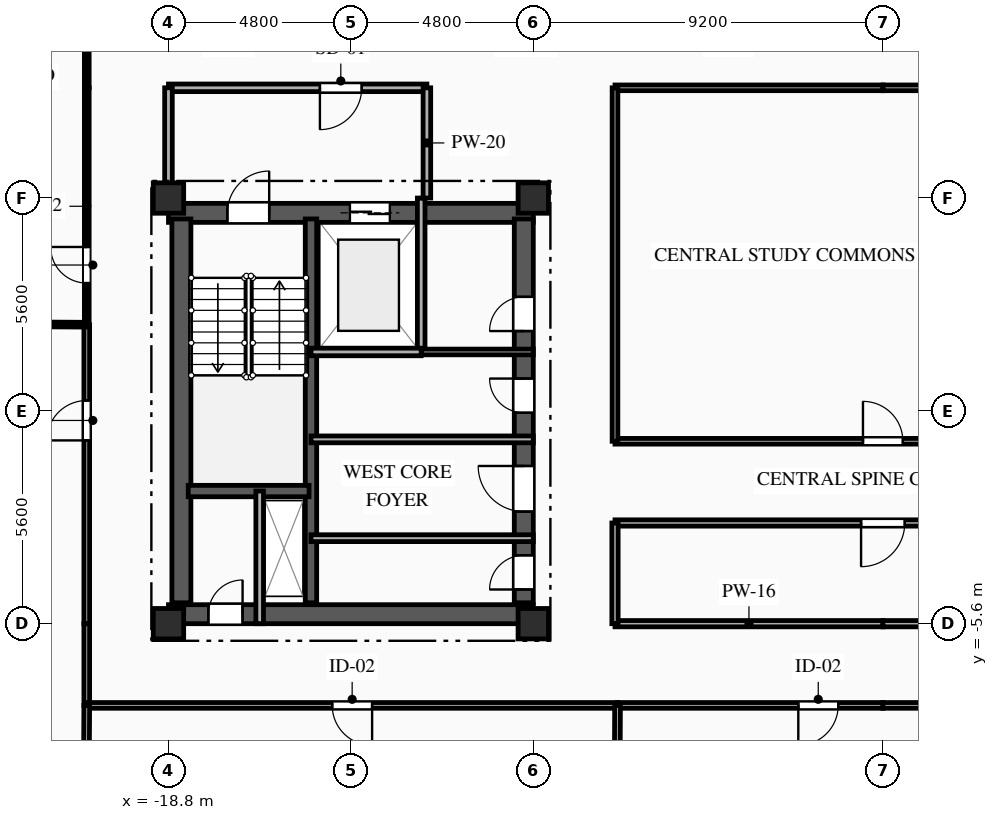
"""IFC4 building model, lengths in metres.
Left out: names, types, materials, properties, quantities, classifications, styles, units other than length and angle.
Written with IfcOpenShell. Run it as: python <this file> out.ifc"""

import sys

from ifc_helpers import new_model, si_unit, direction, frame, frame_2d, origin, origin_2d, place, context, subcontext, project, spatial, rectangle, extrude, element, fill, save


model = new_model("IFC4")
c1 = context("Model", 3, precision=1e-05, world=origin(), true_north=direction((0.0, 1.0)))
c2 = subcontext(c1, "Body", "Model", "MODEL_VIEW")
j1 = project(units=[si_unit("LENGTHUNIT", "METRE"), si_unit("PLANEANGLEUNIT", "RADIAN")], contexts=[c1])
p1 = place(None, origin())
s1 = spatial("IfcSite", under=j1, at=p1, CompositionType="ELEMENT")
p2 = place(p1, origin())
s2 = spatial("IfcBuilding", under=s1, at=p2, CompositionType="ELEMENT")
p3 = place(p2, frame((0.0, 0.0, 199.75)))
s3 = spatial("IfcBuildingStorey", under=s2, at=p3, CompositionType="ELEMENT", Elevation=199.75)
for number, where, z_axis, x_axis in (
    (1, (-18.8, -5.6, 0.0), (0.0, 0.0, 1.0), (1.0, 0.0, 0.0)),
    (2, (-18.8, 5.6, 0.0), (0.0, 0.0, 1.0), (1.0, 0.0, 0.0)),
    (3, (-9.2, -5.6, 0.0), (0.0, 0.0, 1.0), (1.0, 0.0, 0.0)),
    (4, (-9.2, 5.6, 0.0), (0.0, 0.0, 1.0), (1.0, 0.0, 0.0)),
):
    element("IfcColumn", number, at=place(p3, frame(where, z_axis=z_axis, x_axis=x_axis)), inside=s3, PredefinedType="COLUMN", context=c2, shape_type="SweptSolid", body=[
        extrude(rectangle(XDim=0.8, YDim=0.8, at=origin_2d()), origin(), (0.0, 0.0, 1.0), 3.35),
    ])
p4 = place(p3, frame((-18.8, 5.21, 0.0), z_axis=(0.0, 0.0, 1.0), x_axis=(1.0, 0.0, 0.0)))
e5 = element("IfcWall", 5, at=p4, inside=s3, PredefinedType="SHEAR", context=c2, shape_type="SweptSolid", body=[
    extrude(rectangle(XDim=9.6, YDim=0.5, at=frame_2d((4.8, 0.0))), origin(), (0.0, 0.0, 1.0), 3.04),
])
p5 = place(p4, frame((1.55, 0.0, 0.0)))
e6 = element("IfcOpeningElement", 6, at=p5, cuts=e5, PredefinedType="OPENING", context=c2, shape_type="SweptSolid", body=[
    extrude(rectangle(XDim=1.1, YDim=2.15, at=frame_2d((0.55, 1.075))), frame((0.0, 0.26, 0.0), z_axis=(0.0, -1.0, 0.0), x_axis=(1.0, 0.0, 0.0)), (0.0, 0.0, 1.0), 0.52),
])
p6 = place(p4, frame((4.775, 0.0, 0.0)))
e7 = element("IfcOpeningElement", 7, at=p6, cuts=e5, PredefinedType="OPENING", context=c2, shape_type="SweptSolid", body=[
    extrude(rectangle(XDim=1.05, YDim=2.1, at=frame_2d((0.525, 1.05))), frame((0.0, 0.26, 0.0), z_axis=(0.0, -1.0, 0.0), x_axis=(1.0, 0.0, 0.0)), (0.0, 0.0, 1.0), 0.52),
])
p7 = place(p3, frame((-18.8, -5.35, 0.0), z_axis=(0.0, 0.0, 1.0), x_axis=(1.0, 0.0, 0.0)))
e8 = element("IfcWall", 8, at=p7, inside=s3, PredefinedType="SHEAR", context=c2, shape_type="SweptSolid", body=[
    extrude(rectangle(XDim=9.6, YDim=0.5, at=frame_2d((4.8, 0.0))), origin(), (0.0, 0.0, 1.0), 3.04),
])
p8 = place(p7, frame((1.05, 0.0, 0.0)))
e9 = element("IfcOpeningElement", 9, at=p8, cuts=e8, PredefinedType="OPENING", context=c2, shape_type="SweptSolid", body=[
    extrude(rectangle(XDim=0.9, YDim=2.1, at=frame_2d((0.45, 1.05))), frame((0.0, 0.26, 0.0), z_axis=(0.0, -1.0, 0.0), x_axis=(1.0, 0.0, 0.0)), (0.0, 0.0, 1.0), 0.52),
])
p9 = place(p3, frame((-18.46, -5.05, 0.0), z_axis=(0.0, 0.0, 1.0), x_axis=(0.0, 1.0, 0.0)))
e10 = element("IfcWall", 10, at=p9, inside=s3, PredefinedType="SHEAR", context=c2, shape_type="SweptSolid", body=[
    extrude(rectangle(XDim=10.1, YDim=0.5, at=frame_2d((5.05, 0.0))), origin(), (0.0, 0.0, 1.0), 3.04),
])
p10 = place(p3, frame((-9.45, -5.05, 0.0), z_axis=(0.0, 0.0, 1.0), x_axis=(0.0, 1.0, 0.0)))
e11 = element("IfcWall", 11, at=p10, inside=s3, PredefinedType="SHEAR", context=c2, shape_type="SweptSolid", body=[
    extrude(rectangle(XDim=10.1, YDim=0.5, at=frame_2d((5.05, 0.0))), origin(), (0.0, 0.0, 1.0), 3.04),
])
p11 = place(p10, frame((7.15, 0.0, 0.0)))
e12 = element("IfcOpeningElement", 12, at=p11, cuts=e11, PredefinedType="OPENING", context=c2, shape_type="SweptSolid", body=[
    extrude(rectangle(XDim=0.9, YDim=2.1, at=frame_2d((0.45, 1.05))), frame((0.0, 0.26, 0.0), z_axis=(0.0, -1.0, 0.0), x_axis=(1.0, 0.0, 0.0)), (0.0, 0.0, 1.0), 0.52),
])
p12 = place(p10, frame((2.4, 0.0, 0.0)))
e13 = element("IfcOpeningElement", 13, at=p12, cuts=e11, PredefinedType="OPENING", context=c2, shape_type="SweptSolid", body=[
    extrude(rectangle(XDim=1.2, YDim=2.15, at=frame_2d((0.6, 1.075))), frame((0.0, 0.26, 0.0), z_axis=(0.0, -1.0, 0.0), x_axis=(1.0, 0.0, 0.0)), (0.0, 0.0, 1.0), 0.52),
])
p13 = place(p10, frame((0.35, 0.0, 0.0)))
e14 = element("IfcOpeningElement", 14, at=p13, cuts=e11, PredefinedType="OPENING", context=c2, shape_type="SweptSolid", body=[
    extrude(rectangle(XDim=0.9, YDim=2.1, at=frame_2d((0.45, 1.05))), frame((0.0, 0.26, 0.0), z_axis=(0.0, -1.0, 0.0), x_axis=(1.0, 0.0, 0.0)), (0.0, 0.0, 1.0), 0.52),
])
p14 = place(p10, frame((5.0, 0.0, 0.0)))
e15 = element("IfcOpeningElement", 15, at=p14, cuts=e11, PredefinedType="OPENING", context=c2, shape_type="SweptSolid", body=[
    extrude(rectangle(XDim=0.9, YDim=2.1, at=frame_2d((0.45, 1.05))), frame((0.0, 0.26, 0.0), z_axis=(0.0, -1.0, 0.0), x_axis=(1.0, 0.0, 0.0)), (0.0, 0.0, 1.0), 0.52),
])
p15 = place(p3, frame((-15.05, -5.05, 0.0), z_axis=(0.0, 0.0, 1.0), x_axis=(0.0, 1.0, 0.0)))
e16 = element("IfcWall", 16, at=p15, inside=s3, PredefinedType="SHEAR", context=c2, shape_type="SweptSolid", body=[
    extrude(rectangle(XDim=10.1, YDim=0.3, at=frame_2d((5.05, 0.0))), origin(), (0.0, 0.0, 1.0), 3.04),
])
p16 = place(p3, frame((-18.28, -2.11, 0.0), z_axis=(0.0, 0.0, 1.0), x_axis=(1.0, 0.0, 0.0)))
e17 = element("IfcWall", 17, at=p16, inside=s3, PredefinedType="SHEAR", context=c2, shape_type="SweptSolid", body=[
    extrude(rectangle(XDim=3.18, YDim=0.3, at=frame_2d((1.59, 0.0))), origin(), (0.0, 0.0, 1.0), 3.04),
])
p17 = place(p3, frame((-16.4, -5.6, 0.0), z_axis=(0.0, 0.0, 1.0), x_axis=(0.0, 1.0, 0.0)))
e18 = element("IfcWall", 18, at=p17, inside=s3, PredefinedType="PARTITIONING", context=c2, shape_type="SweptSolid", body=[
    extrude(rectangle(XDim=3.49, YDim=0.2, at=frame_2d((1.745, 0.0))), origin(), (0.0, 0.0, 1.0), 3.04),
])
p18 = place(p3, frame((-12.15, 1.55, 0.0), z_axis=(0.0, 0.0, 1.0), x_axis=(0.0, 1.0, 0.0)))
e19 = element("IfcWall", 19, at=p18, inside=s3, PredefinedType="PARTITIONING", context=c2, shape_type="SweptSolid", body=[
    extrude(rectangle(XDim=4.05, YDim=0.2, at=frame_2d((2.025, 0.0))), origin(), (0.0, 0.0, 1.0), 3.04),
])
p19 = place(p3, frame((-12.0, 8.5, 0.0), z_axis=(0.0, 0.0, 1.0), x_axis=(-1.0, 0.0, 0.0)))
e20 = element("IfcWall", 20, at=p19, inside=s3, PredefinedType="PARTITIONING", context=c2, shape_type="SweptSolid", body=[
    extrude(rectangle(XDim=6.8, YDim=0.2, at=frame_2d((3.4, 0.0))), origin(), (0.0, 0.0, 1.0), 3.04),
])
p20 = place(p19, frame((1.715, 0.0, 0.0)))
e21 = element("IfcOpeningElement", 21, at=p20, cuts=e20, PredefinedType="OPENING", context=c2, shape_type="SweptSolid", body=[
    extrude(rectangle(XDim=1.1, YDim=2.15, at=frame_2d((0.55, 1.075))), frame((0.0, 0.11, 0.0), z_axis=(0.0, -1.0, 0.0), x_axis=(1.0, 0.0, 0.0)), (0.0, 0.0, 1.0), 0.22),
])
p21 = place(p3, frame((-18.8, 8.5, 0.0), z_axis=(0.0, 0.0, 1.0), x_axis=(0.0, -1.0, 0.0)))
e22 = element("IfcWall", 22, at=p21, inside=s3, PredefinedType="PARTITIONING", context=c2, shape_type="SweptSolid", body=[
    extrude(rectangle(XDim=2.9, YDim=0.2, at=frame_2d((1.45, 0.0))), origin(), (0.0, 0.0, 1.0), 2.665),
])
p22 = place(p3, frame((-12.0, 5.6, 0.0), z_axis=(0.0, 0.0, 1.0), x_axis=(0.0, 1.0, 0.0)))
e23 = element("IfcWall", 23, at=p22, inside=s3, PredefinedType="PARTITIONING", context=c2, shape_type="SweptSolid", body=[
    extrude(rectangle(XDim=2.9, YDim=0.2, at=frame_2d((1.45, 0.0))), origin(), (0.0, 0.0, 1.0), 3.04),
])
p23 = place(p3, frame((-12.15, 1.55, 0.0), z_axis=(0.0, 0.0, 1.0), x_axis=(1.0, 0.0, 0.0)))
e24 = element("IfcWall", 24, at=p23, inside=s3, PredefinedType="PARTITIONING", context=c2, shape_type="SweptSolid", body=[
    extrude(rectangle(XDim=2.95, YDim=0.15, at=frame_2d((1.475, 0.0))), origin(), (0.0, 0.0, 1.0), 3.04),
])
p24 = place(p3, frame((-15.05, -3.35, 0.0), z_axis=(0.0, 0.0, 1.0), x_axis=(1.0, 0.0, 0.0)))
e25 = element("IfcWall", 25, at=p24, inside=s3, PredefinedType="PARTITIONING", context=c2, shape_type="SweptSolid", body=[
    extrude(rectangle(XDim=5.85, YDim=0.18, at=frame_2d((2.925, 0.0))), origin(), (0.0, 0.0, 1.0), 2.755),
])
p25 = place(p3, frame((-9.2, -0.75, 0.0), z_axis=(0.0, 0.0, 1.0), x_axis=(-1.0, 0.0, 0.0)))
e26 = element("IfcWall", 26, at=p25, inside=s3, PredefinedType="PARTITIONING", context=c2, shape_type="SweptSolid", body=[
    extrude(rectangle(XDim=5.85, YDim=0.18, at=frame_2d((2.925, 0.0))), origin(), (0.0, 0.0, 1.0), 3.04),
])
p26 = place(p3, frame((-20.95, 8.5, 0.0), z_axis=(0.0, 0.0, 1.0), x_axis=(0.0, 1.0, 0.0)))
e27 = element("IfcWall", 27, at=p26, inside=s3, PredefinedType="PARTITIONING", context=c2, shape_type="SweptSolid", body=[
    extrude(rectangle(XDim=2.15, YDim=0.125, at=frame_2d((1.075, 0.0))), origin(), (0.0, 0.0, 1.0), 3.04),
])
for number, where, z_axis, x_axis in (
    (28, (0.0, 8.5, 0.0), (0.0, 0.0, 1.0), (-1.0, 0.0, 0.0)),
    (29, (7.05, 8.5, 0.0), (0.0, 0.0, 1.0), (-1.0, 0.0, 0.0)),
):
    element("IfcWall", number, at=place(p3, frame(where, z_axis=z_axis, x_axis=x_axis)), inside=s3, PredefinedType="PARTITIONING", context=c2, shape_type="SweptSolid", body=[
        extrude(rectangle(XDim=7.05, YDim=0.15, at=frame_2d((3.525, 0.0))), origin(), (0.0, 0.0, 1.0), 3.04),
    ])
p27 = place(p3, frame((-20.95, -7.75, 0.0), z_axis=(0.0, 0.0, 1.0), x_axis=(0.0, 1.0, 0.0)))
e30 = element("IfcWall", 30, at=p27, inside=s3, PredefinedType="PARTITIONING", context=c2, shape_type="SweptSolid", body=[
    extrude(rectangle(XDim=2.15, YDim=0.15, at=frame_2d((1.075, 0.0))), origin(), (0.0, 0.0, 1.0), 3.04),
])
p28 = place(p3, frame((-6.983, -7.75, 0.0), z_axis=(0.0, 0.0, 1.0), x_axis=(-1.0, 0.0, 0.0)))
e31 = element("IfcWall", 31, at=p28, inside=s3, PredefinedType="PARTITIONING", context=c2, shape_type="SweptSolid", body=[
    extrude(rectangle(XDim=13.967, YDim=0.15, at=frame_2d((6.983, 0.0))), origin(), (0.0, 0.0, 1.0), 3.04),
])
p29 = place(p28, frame((6.458, 0.0, 0.0)))
e32 = element("IfcOpeningElement", 32, at=p29, cuts=e31, PredefinedType="OPENING", context=c2, shape_type="SweptSolid", body=[
    extrude(rectangle(XDim=1.05, YDim=2.15, at=frame_2d((0.525, 1.075))), frame((0.0, 0.085, 0.0), z_axis=(0.0, -1.0, 0.0), x_axis=(1.0, 0.0, 0.0)), (0.0, 0.0, 1.0), 0.17),
])
p30 = place(p3, frame((0.0, -7.75, 0.0), z_axis=(0.0, 0.0, 1.0), x_axis=(-1.0, 0.0, 0.0)))
e33 = element("IfcWall", 33, at=p30, inside=s3, PredefinedType="PARTITIONING", context=c2, shape_type="SweptSolid", body=[
    extrude(rectangle(XDim=6.983, YDim=0.15, at=frame_2d((3.491, 0.0))), origin(), (0.0, 0.0, 1.0), 3.04),
])
p31 = place(p30, frame((1.177, 0.0, 0.0)))
e34 = element("IfcOpeningElement", 34, at=p31, cuts=e33, PredefinedType="OPENING", context=c2, shape_type="SweptSolid", body=[
    extrude(rectangle(XDim=1.05, YDim=2.15, at=frame_2d((0.525, 1.075))), frame((0.0, 0.085, 0.0), z_axis=(0.0, -1.0, 0.0), x_axis=(1.0, 0.0, 0.0)), (0.0, 0.0, 1.0), 0.17),
])
p32 = place(p3, frame((-7.05, -5.6, 0.0), z_axis=(0.0, 0.0, 1.0), x_axis=(1.0, 0.0, 0.0)))
e35 = element("IfcWall", 35, at=p32, inside=s3, PredefinedType="PARTITIONING", context=c2, shape_type="SweptSolid", body=[
    extrude(rectangle(XDim=7.05, YDim=0.165, at=frame_2d((3.525, 0.0))), origin(), (0.0, 0.0, 1.0), 2.525),
])
p33 = place(p3, frame((6.983, -7.75, 0.0), z_axis=(0.0, 0.0, 1.0), x_axis=(-1.0, 0.0, 0.0)))
e36 = element("IfcWall", 36, at=p33, inside=s3, PredefinedType="PARTITIONING", context=c2, shape_type="SweptSolid", body=[
    extrude(rectangle(XDim=6.983, YDim=0.15, at=frame_2d((3.491, 0.0))), origin(), (0.0, 0.0, 1.0), 3.04),
])
p34 = place(p3, frame((0.0, -5.6, 0.0), z_axis=(0.0, 0.0, 1.0), x_axis=(1.0, 0.0, 0.0)))
e37 = element("IfcWall", 37, at=p34, inside=s3, PredefinedType="PARTITIONING", context=c2, shape_type="SweptSolid", body=[
    extrude(rectangle(XDim=7.05, YDim=0.165, at=frame_2d((3.525, 0.0))), origin(), (0.0, 0.0, 1.0), 2.525),
])
p35 = place(p3, frame((-20.95, -5.6, 0.0), z_axis=(0.0, 0.0, 1.0), x_axis=(0.0, 1.0, 0.0)))
e38 = element("IfcWall", 38, at=p35, inside=s3, PredefinedType="PARTITIONING", context=c2, shape_type="SweptSolid", body=[
    extrude(rectangle(XDim=7.867, YDim=0.15, at=frame_2d((3.934, 0.0))), origin(), (0.0, 0.0, 1.0), 3.04),
])
p36 = place(p35, frame((4.823, 0.0, 0.0)))
e39 = element("IfcOpeningElement", 39, at=p36, cuts=e38, PredefinedType="OPENING", context=c2, shape_type="SweptSolid", body=[
    extrude(rectangle(XDim=1.05, YDim=2.15, at=frame_2d((0.525, 1.075))), frame((0.0, 0.085, 0.0), z_axis=(0.0, -1.0, 0.0), x_axis=(1.0, 0.0, 0.0)), (0.0, 0.0, 1.0), 0.17),
])
p37 = place(p3, frame((-20.95, 2.267, 0.0), z_axis=(0.0, 0.0, 1.0), x_axis=(0.0, 1.0, 0.0)))
e40 = element("IfcWall", 40, at=p37, inside=s3, PredefinedType="PARTITIONING", context=c2, shape_type="SweptSolid", body=[
    extrude(rectangle(XDim=6.233, YDim=0.125, at=frame_2d((3.116, 0.0))), origin(), (0.0, 0.0, 1.0), 3.04),
])
p38 = place(p37, frame((1.095, 0.0, 0.0)))
e41 = element("IfcOpeningElement", 41, at=p38, cuts=e40, PredefinedType="OPENING", context=c2, shape_type="SweptSolid", body=[
    extrude(rectangle(XDim=0.95, YDim=2.1, at=frame_2d((0.475, 1.05))), frame((0.0, 0.073, 0.0), z_axis=(0.0, -1.0, 0.0), x_axis=(1.0, 0.0, 0.0)), (0.0, 0.0, 1.0), 0.145),
])
p39 = place(p3, frame((-7.05, -0.8, 0.0), z_axis=(0.0, 0.0, 1.0), x_axis=(1.0, 0.0, 0.0)))
e42 = element("IfcWall", 42, at=p39, inside=s3, PredefinedType="PARTITIONING", context=c2, shape_type="SweptSolid", body=[
    extrude(rectangle(XDim=14.1, YDim=0.15, at=frame_2d((7.05, 0.0))), origin(), (0.0, 0.0, 1.0), 3.04),
])
p40 = place(p39, frame((6.525, 0.0, 0.0)))
e43 = element("IfcOpeningElement", 43, at=p40, cuts=e42, PredefinedType="OPENING", context=c2, shape_type="SweptSolid", body=[
    extrude(rectangle(XDim=1.05, YDim=2.15, at=frame_2d((0.525, 1.075))), frame((0.0, 0.085, 0.0), z_axis=(0.0, -1.0, 0.0), x_axis=(1.0, 0.0, 0.0)), (0.0, 0.0, 1.0), 0.17),
])
p41 = place(p3, frame((7.05, -2.95, 0.0), z_axis=(0.0, 0.0, 1.0), x_axis=(-1.0, 0.0, 0.0)))
e44 = element("IfcWall", 44, at=p41, inside=s3, PredefinedType="PARTITIONING", context=c2, shape_type="SweptSolid", body=[
    extrude(rectangle(XDim=14.1, YDim=0.165, at=frame_2d((7.05, 0.0))), origin(), (0.0, 0.0, 1.0), 3.04),
])
p42 = place(p41, frame((6.475, 0.0, 0.0)))
e45 = element("IfcOpeningElement", 45, at=p42, cuts=e44, PredefinedType="OPENING", context=c2, shape_type="SweptSolid", body=[
    extrude(rectangle(XDim=1.15, YDim=2.15, at=frame_2d((0.575, 1.075))), frame((0.0, 0.093, 0.0), z_axis=(0.0, -1.0, 0.0), x_axis=(1.0, 0.0, 0.0)), (0.0, 0.0, 1.0), 0.185),
])
p43 = place(p3, frame((-7.05, 8.5, 0.0), z_axis=(0.0, 0.0, 1.0), x_axis=(0.0, -1.0, 0.0)))
e46 = element("IfcWall", 46, at=p43, inside=s3, PredefinedType="PARTITIONING", context=c2, shape_type="SweptSolid", body=[
    extrude(rectangle(XDim=9.3, YDim=0.15, at=frame_2d((4.65, 0.0))), origin(), (0.0, 0.0, 1.0), 3.04),
])
p44 = place(p3, frame((-7.05, -2.95, 0.0), z_axis=(0.0, 0.0, 1.0), x_axis=(0.0, -1.0, 0.0)))
e47 = element("IfcWall", 47, at=p44, inside=s3, PredefinedType="PARTITIONING", context=c2, shape_type="SweptSolid", body=[
    extrude(rectangle(XDim=2.65, YDim=0.165, at=frame_2d((1.325, 0.0))), origin(), (0.0, 0.0, 1.0), 3.04),
])
p45 = place(p3, frame((-28.021, 2.311, 0.0), z_axis=(0.0, 0.0, 1.0), x_axis=(0.99998090118, -0.006180394355, 0.0)))
e48 = element("IfcWall", 48, at=p45, inside=s3, PredefinedType="PARTITIONING", context=c2, shape_type="SweptSolid", body=[
    extrude(rectangle(XDim=7.071, YDim=0.125, at=frame_2d((3.536, 0.0))), origin(), (0.0, 0.0, 1.0), 3.04),
])
p46 = place(p3, frame((-20.95, -7.75, 0.0), z_axis=(0.0, 0.0, 1.0), x_axis=(-0.005804668564, -0.99998315277, 0.0)))
e49 = element("IfcWall", 49, at=p46, inside=s3, PredefinedType="PARTITIONING", context=c2, shape_type="SweptSolid", body=[
    extrude(rectangle(XDim=7.571, YDim=0.15, at=frame_2d((3.785, 0.0))), origin(), (0.0, 0.0, 1.0), 3.04),
])
p47 = place(p3, frame((-6.983, -7.75, 0.0), z_axis=(0.0, 0.0, 1.0), x_axis=(-0.004861916497, -0.999988180814, 0.0)))
e50 = element("IfcWall", 50, at=p47, inside=s3, PredefinedType="PARTITIONING", context=c2, shape_type="SweptSolid", body=[
    extrude(rectangle(XDim=9.039, YDim=0.15, at=frame_2d((4.519, 0.0))), origin(), (0.0, 0.0, 1.0), 3.04),
])
p48 = place(p3, frame((-15.05, 1.55, 0.0), z_axis=(0.0, 0.0, 1.0), x_axis=(1.0, 0.0, 0.0)))
e51 = element("IfcWall", 51, at=p48, inside=s3, PredefinedType="PARTITIONING", context=c2, shape_type="SweptSolid", body=[
    extrude(rectangle(XDim=2.9, YDim=0.2, at=frame_2d((1.45, 0.0))), origin(), (0.0, 0.0, 1.0), 3.04),
])
p49 = place(p5, origin())
e52 = element("IfcDoor", 52, at=p49, inside=s3, OperationType="SINGLE_SWING_RIGHT", PredefinedType="DOOR", context=c2, shape_type="SweptSolid", body=[
    extrude(rectangle(XDim=1.1, YDim=2.15, at=frame_2d((0.55, 1.075))), frame((0.0, 0.025, 0.0), z_axis=(0.0, -1.0, 0.0), x_axis=(1.0, 0.0, 0.0)), (0.0, 0.0, 1.0), 0.05),
])
fill(e6, e52)
p50 = place(p6, origin())
e53 = element("IfcDoor", 53, at=p50, inside=s3, OperationType="DOUBLE_DOOR_SLIDING", PredefinedType="DOOR", context=c2, shape_type="SweptSolid", body=[
    extrude(rectangle(XDim=1.05, YDim=2.1, at=frame_2d((0.525, 1.05))), frame((0.0, 0.025, 0.0), z_axis=(0.0, -1.0, 0.0), x_axis=(1.0, 0.0, 0.0)), (0.0, 0.0, 1.0), 0.05),
])
fill(e7, e53)
p51 = place(p8, origin())
e54 = element("IfcDoor", 54, at=p51, inside=s3, OperationType="SINGLE_SWING_RIGHT", PredefinedType="DOOR", context=c2, shape_type="SweptSolid", body=[
    extrude(rectangle(XDim=0.9, YDim=2.1, at=frame_2d((0.45, 1.05))), frame((0.0, 0.025, 0.0), z_axis=(0.0, -1.0, 0.0), x_axis=(1.0, 0.0, 0.0)), (0.0, 0.0, 1.0), 0.05),
])
fill(e9, e54)
p52 = place(p20, origin())
e55 = element("IfcDoor", 55, at=p52, inside=s3, OperationType="SINGLE_SWING_RIGHT", PredefinedType="DOOR", context=c2, shape_type="SweptSolid", body=[
    extrude(rectangle(XDim=1.1, YDim=2.15, at=frame_2d((0.55, 1.075))), frame((0.0, 0.025, 0.0), z_axis=(0.0, -1.0, 0.0), x_axis=(1.0, 0.0, 0.0)), (0.0, 0.0, 1.0), 0.05),
])
fill(e21, e55)
p53 = place(p11, origin())
e56 = element("IfcDoor", 56, at=p53, inside=s3, OperationType="SINGLE_SWING_LEFT", PredefinedType="DOOR", context=c2, shape_type="SweptSolid", body=[
    extrude(rectangle(XDim=0.9, YDim=2.1, at=frame_2d((0.45, 1.05))), frame((0.0, 0.025, 0.0), z_axis=(0.0, -1.0, 0.0), x_axis=(1.0, 0.0, 0.0)), (0.0, 0.0, 1.0), 0.05),
])
fill(e12, e56)
p54 = place(p12, origin())
e57 = element("IfcDoor", 57, at=p54, inside=s3, OperationType="SINGLE_SWING_RIGHT", PredefinedType="DOOR", context=c2, shape_type="SweptSolid", body=[
    extrude(rectangle(XDim=1.2, YDim=2.15, at=frame_2d((0.6, 1.075))), frame((0.0, 0.025, 0.0), z_axis=(0.0, -1.0, 0.0), x_axis=(1.0, 0.0, 0.0)), (0.0, 0.0, 1.0), 0.05),
])
fill(e13, e57)
p55 = place(p13, origin())
e58 = element("IfcDoor", 58, at=p55, inside=s3, OperationType="SINGLE_SWING_LEFT", PredefinedType="DOOR", context=c2, shape_type="SweptSolid", body=[
    extrude(rectangle(XDim=0.9, YDim=2.1, at=frame_2d((0.45, 1.05))), frame((0.0, 0.025, 0.0), z_axis=(0.0, -1.0, 0.0), x_axis=(1.0, 0.0, 0.0)), (0.0, 0.0, 1.0), 0.05),
])
fill(e14, e58)
p56 = place(p14, origin())
e59 = element("IfcDoor", 59, at=p56, inside=s3, OperationType="SINGLE_SWING_RIGHT", PredefinedType="DOOR", context=c2, shape_type="SweptSolid", body=[
    extrude(rectangle(XDim=0.9, YDim=2.1, at=frame_2d((0.45, 1.05))), frame((0.0, 0.025, 0.0), z_axis=(0.0, -1.0, 0.0), x_axis=(1.0, 0.0, 0.0)), (0.0, 0.0, 1.0), 0.05),
])
fill(e15, e59)
p57 = place(p29, origin())
e60 = element("IfcDoor", 60, at=p57, inside=s3, OperationType="SINGLE_SWING_LEFT", PredefinedType="DOOR", context=c2, shape_type="SweptSolid", body=[
    extrude(rectangle(XDim=1.05, YDim=2.15, at=frame_2d((0.525, 1.075))), frame((0.0, 0.025, 0.0), z_axis=(0.0, -1.0, 0.0), x_axis=(1.0, 0.0, 0.0)), (0.0, 0.0, 1.0), 0.05),
])
fill(e32, e60)
p58 = place(p31, origin())
e61 = element("IfcDoor", 61, at=p58, inside=s3, OperationType="SINGLE_SWING_RIGHT", PredefinedType="DOOR", context=c2, shape_type="SweptSolid", body=[
    extrude(rectangle(XDim=1.05, YDim=2.15, at=frame_2d((0.525, 1.075))), frame((0.0, 0.025, 0.0), z_axis=(0.0, -1.0, 0.0), x_axis=(1.0, 0.0, 0.0)), (0.0, 0.0, 1.0), 0.05),
])
fill(e34, e61)
p59 = place(p36, origin())
e62 = element("IfcDoor", 62, at=p59, inside=s3, OperationType="SINGLE_SWING_LEFT", PredefinedType="DOOR", context=c2, shape_type="SweptSolid", body=[
    extrude(rectangle(XDim=1.05, YDim=2.15, at=frame_2d((0.525, 1.075))), frame((0.0, 0.025, 0.0), z_axis=(0.0, -1.0, 0.0), x_axis=(1.0, 0.0, 0.0)), (0.0, 0.0, 1.0), 0.05),
])
fill(e39, e62)
p60 = place(p38, origin())
e63 = element("IfcDoor", 63, at=p60, inside=s3, OperationType="SINGLE_SWING_RIGHT", PredefinedType="DOOR", context=c2, shape_type="SweptSolid", body=[
    extrude(rectangle(XDim=0.95, YDim=2.1, at=frame_2d((0.475, 1.05))), frame((0.0, 0.025, 0.0), z_axis=(0.0, -1.0, 0.0), x_axis=(1.0, 0.0, 0.0)), (0.0, 0.0, 1.0), 0.05),
])
fill(e41, e63)
p61 = place(p40, origin())
e64 = element("IfcDoor", 64, at=p61, inside=s3, OperationType="SINGLE_SWING_LEFT", PredefinedType="DOOR", context=c2, shape_type="SweptSolid", body=[
    extrude(rectangle(XDim=1.05, YDim=2.15, at=frame_2d((0.525, 1.075))), frame((0.0, 0.025, 0.0), z_axis=(0.0, -1.0, 0.0), x_axis=(1.0, 0.0, 0.0)), (0.0, 0.0, 1.0), 0.05),
])
fill(e43, e64)
p62 = place(p42, origin())
e65 = element("IfcDoor", 65, at=p62, inside=s3, OperationType="SINGLE_SWING_RIGHT", PredefinedType="DOOR", context=c2, shape_type="SweptSolid", body=[
    extrude(rectangle(XDim=1.15, YDim=2.15, at=frame_2d((0.575, 1.075))), frame((0.0, 0.025, 0.0), z_axis=(0.0, -1.0, 0.0), x_axis=(1.0, 0.0, 0.0)), (0.0, 0.0, 1.0), 0.05),
])
fill(e45, e65)
save(model, sys.argv[1])
